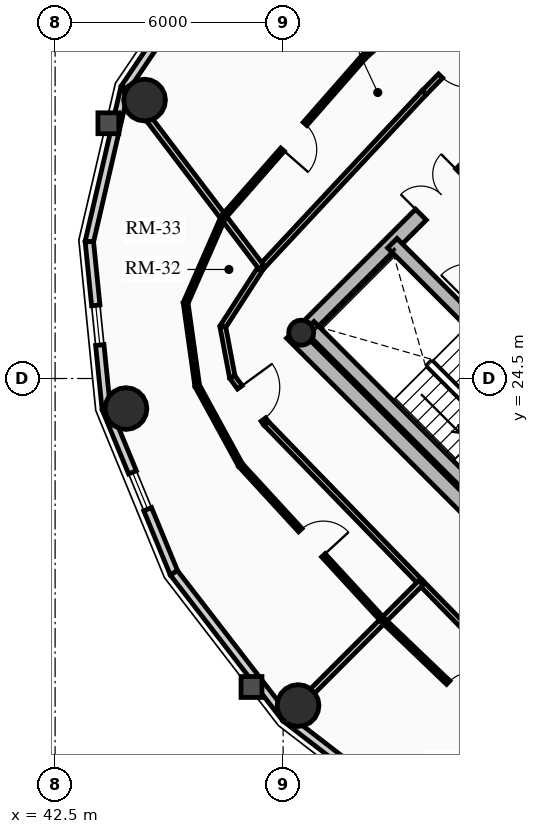
"""IFC4 building model, lengths in metres.
Left out: names, types, materials, properties, quantities, classifications, styles, units other than length and angle.
Written with IfcOpenShell. Run it as: python <this file> out.ifc"""

import sys

from ifc_helpers import new_model, si_unit, direction, frame, frame_2d, origin, origin_2d, place, context, subcontext, project, spatial, rectangle, circle, hollow_circle, extrude, source, transform, mapped, element, fill, save


model = new_model("IFC4")
c1 = context("Model", 3, precision=1e-05, world=origin(), true_north=direction((0.0, 1.0)))
c2 = subcontext(c1, "Body", "Model", "MODEL_VIEW")
j1 = project(units=[si_unit("LENGTHUNIT", "METRE"), si_unit("PLANEANGLEUNIT", "RADIAN")], contexts=[c1])
p1 = place(None, origin())
s1 = spatial("IfcSite", under=j1, at=p1, CompositionType="ELEMENT")
p2 = place(p1, origin())
s2 = spatial("IfcBuilding", under=s1, at=p2, CompositionType="ELEMENT")
p3 = place(p2, frame((0.0, 0.0, 222.85)))
s3 = spatial("IfcBuildingStorey", under=s2, at=p3, CompositionType="ELEMENT", Elevation=222.85)
p4 = place(p3, frame((58.702, 15.732, 0.0), z_axis=(0.0, 0.0, 1.0), x_axis=(-0.707106781187, 0.707106781187, 0.0)))
e1 = element("IfcWall", 1, at=p4, inside=s3, PredefinedType="SHEAR", context=c2, shape_type="SweptSolid", body=[
    extrude(rectangle(XDim=14.1, YDim=0.4, at=frame_2d((7.05, 0.0))), origin(), (0.0, 0.0, 1.0), 3.2),
])
p5 = place(p3, frame((48.873, 25.561, 0.0), z_axis=(0.0, 0.0, 1.0), x_axis=(0.707106781187, 0.707106781187, 0.0)))
e2 = element("IfcWall", 2, at=p5, inside=s3, PredefinedType="SHEAR", context=c2, shape_type="SweptSolid", body=[
    extrude(rectangle(XDim=10.7, YDim=0.4, at=frame_2d((5.35, 0.0))), origin(), (0.0, 0.0, 1.0), 3.2),
])
m1 = source(origin(), c2, "Body", "SweptSolid", [
    extrude(rectangle(XDim=1.5, YDim=2.02, at=frame_2d((0.75, 1.01))), frame((0.0, 0.21, 0.0), z_axis=(0.0, -1.0, 0.0), x_axis=(1.0, 0.0, 0.0)), (0.0, 0.0, 1.0), 0.42),
])
p6 = place(p5, frame((4.6, 0.0, 0.0)))
e3 = element("IfcOpeningElement", 3, at=p6, cuts=e2, PredefinedType="OPENING", context=c2, shape_type="MappedRepresentation", body=[
    mapped(m1, transform((0.0, 0.0, 0.0), x_axis=(1.0, 0.0, 0.0), y_axis=(0.0, 1.0, 0.0), z_axis=(0.0, 0.0, 1.0), scale=1.0)),
])
p7 = place(p3, frame((61.06, 18.373, 0.0), z_axis=(0.0, 0.0, 1.0), x_axis=(-0.707106781187, 0.707106781187, 0.0)))
e4 = element("IfcWall", 4, at=p7, inside=s3, PredefinedType="SHEAR", context=c2, shape_type="SweptSolid", body=[
    extrude(rectangle(XDim=13.7, YDim=0.35, at=frame_2d((6.85, 0.0))), origin(), (0.0, 0.0, 1.0), 3.2),
])
m2 = source(origin(), c2, "Body", "SweptSolid", [
    extrude(rectangle(XDim=1.1, YDim=2.015, at=frame_2d((0.55, 1.007))), frame((0.0, 0.185, 0.0), z_axis=(0.0, -1.0, 0.0), x_axis=(1.0, 0.0, 0.0)), (0.0, 0.0, 1.0), 0.37),
])
p8 = place(p7, frame((4.85, 0.0, 0.0)))
e5 = element("IfcOpeningElement", 5, at=p8, cuts=e4, PredefinedType="OPENING", context=c2, shape_type="MappedRepresentation", body=[
    mapped(m2, transform((0.0, 0.0, 0.0), x_axis=(1.0, 0.0, 0.0), y_axis=(0.0, 1.0, 0.0), z_axis=(0.0, 0.0, 1.0), scale=1.0)),
])
p9 = place(p7, frame((0.625, 0.0, 0.0)))
e6 = element("IfcOpeningElement", 6, at=p9, cuts=e4, PredefinedType="OPENING", context=c2, shape_type="MappedRepresentation", body=[
    mapped(m2, transform((0.0, 0.0, 0.0), x_axis=(1.0, 0.0, 0.0), y_axis=(0.0, 1.0, 0.0), z_axis=(0.0, 0.0, 1.0), scale=1.0)),
])
p10 = place(p7, frame((2.625, 0.0, 0.0)))
e7 = element("IfcOpeningElement", 7, at=p10, cuts=e4, PredefinedType="OPENING", context=c2, shape_type="MappedRepresentation", body=[
    mapped(m2, transform((0.0, 0.0, 0.0), x_axis=(1.0, 0.0, 0.0), y_axis=(0.0, 1.0, 0.0), z_axis=(0.0, 0.0, 1.0), scale=1.0)),
])
m3 = source(origin(), c2, "Body", "SweptSolid", [
    extrude(rectangle(XDim=1.15, YDim=2.02, at=frame_2d((0.575, 1.01))), frame((0.0, 0.185, 0.0), z_axis=(0.0, -1.0, 0.0), x_axis=(1.0, 0.0, 0.0)), (0.0, 0.0, 1.0), 0.37),
])
p11 = place(p7, frame((7.27, 0.0, 0.0)))
e8 = element("IfcOpeningElement", 8, at=p11, cuts=e4, PredefinedType="OPENING", context=c2, shape_type="MappedRepresentation", body=[
    mapped(m3, transform((0.0, 0.0, 0.0), x_axis=(1.0, 0.0, 0.0), y_axis=(0.0, 1.0, 0.0), z_axis=(0.0, 0.0, 1.0), scale=1.0)),
])
p12 = place(p3, frame((53.922, 21.141, 0.0), z_axis=(0.0, 0.0, 1.0), x_axis=(-0.707106781187, 0.707106781187, 0.0)))
e9 = element("IfcWall", 9, at=p12, inside=s3, PredefinedType="SHEAR", context=c2, shape_type="SweptSolid", body=[
    extrude(rectangle(XDim=6.695, YDim=0.35, at=frame_2d((3.348, 0.0))), origin(), (0.0, 0.0, 1.0), 3.2),
])
p13 = place(p3, frame((48.976, 25.706, 0.0), z_axis=(0.0, 0.0, 1.0), x_axis=(0.707106781187, 0.707106781187, 0.0)))
e10 = element("IfcColumn", 10, at=p13, inside=s3, PredefinedType="COLUMN", context=c2, shape_type="SweptSolid", body=[
    extrude(hollow_circle(Radius=0.33, WallThickness=0.025, at=origin_2d()), origin(), (0.0, 0.0, 1.0), 3.2),
])
for number, where, z_axis, x_axis in (
    (11, (44.854, 31.827, 0.0), (0.0, 0.0, 1.0), (1.0, 0.0, 0.0)),
    (12, (44.365, 23.709, 0.0), (0.0, 0.0, 1.0), (1.0, 0.0, 0.0)),
    (13, (48.893, 15.893, 0.0), (0.0, 0.0, 1.0), (1.0, 0.0, 0.0)),
):
    element("IfcColumn", number, at=place(p3, frame(where, z_axis=z_axis, x_axis=x_axis)), inside=s3, PredefinedType="USERDEFINED", context=c2, shape_type="SweptSolid", body=[
        extrude(circle(Radius=0.55, at=origin_2d()), origin(), (0.0, 0.0, 1.0), 3.2),
    ])
p14 = place(p3, frame((44.337, 32.144, 0.0), z_axis=(0.0, 0.0, 1.0), x_axis=(0.559495003079, 0.828833723692, 0.0)))
e14 = element("IfcWall", 14, at=p14, inside=s3, PredefinedType="SOLIDWALL", context=c2, shape_type="SweptSolid", body=[
    extrude(rectangle(XDim=3.976, YDim=0.22, at=frame_2d((1.988, 0.0))), origin(), (0.0, 0.0, 1.0), 2.612),
])
m4 = source(origin(), c2, "Body", "SweptSolid", [
    extrude(rectangle(XDim=1.05, YDim=1.3, at=frame_2d((0.525, 0.65))), frame((0.0, 0.12, 0.0), z_axis=(0.0, -1.0, 0.0), x_axis=(1.0, 0.0, 0.0)), (0.0, 0.0, 1.0), 0.24),
])
p15 = place(p14, frame((1.463, 0.0, 0.65)))
e15 = element("IfcOpeningElement", 15, at=p15, cuts=e14, PredefinedType="OPENING", context=c2, shape_type="MappedRepresentation", body=[
    mapped(m4, transform((0.0, 0.0, 0.0), x_axis=(1.0, 0.0, 0.0), y_axis=(0.0, 1.0, 0.0), z_axis=(0.0, 0.0, 1.0), scale=1.0)),
])
p16 = place(p3, frame((43.401, 28.1, 0.0), z_axis=(0.0, 0.0, 1.0), x_axis=(0.225473813158, 0.974249228678, 0.0)))
e16 = element("IfcWall", 16, at=p16, inside=s3, PredefinedType="SOLIDWALL", context=c2, shape_type="SweptSolid", body=[
    extrude(rectangle(XDim=4.15, YDim=0.22, at=frame_2d((2.075, 0.0))), origin(), (0.0, 0.0, 1.0), 2.612),
])
p17 = place(p3, frame((43.845, 23.705, 0.0), z_axis=(0.0, 0.0, 1.0), x_axis=(-0.100570534541, 0.994929930991, 0.0)))
e17 = element("IfcWall", 17, at=p17, inside=s3, PredefinedType="SOLIDWALL", context=c2, shape_type="SweptSolid", body=[
    extrude(rectangle(XDim=4.418, YDim=0.22, at=frame_2d((2.209, 0.0))), origin(), (0.0, 0.0, 1.0), 2.612),
])
p18 = place(p17, frame((1.684, 0.0, 0.65)))
e18 = element("IfcOpeningElement", 18, at=p18, cuts=e17, PredefinedType="OPENING", context=c2, shape_type="MappedRepresentation", body=[
    mapped(m4, transform((0.0, 0.0, 0.0), x_axis=(1.0, 0.0, 0.0), y_axis=(0.0, 1.0, 0.0), z_axis=(0.0, 0.0, 1.0), scale=1.0)),
])
p19 = place(p3, frame((45.626, 19.387, 0.0), z_axis=(0.0, 0.0, 1.0), x_axis=(-0.381309704956, 0.924447353237, 0.0)))
e19 = element("IfcWall", 19, at=p19, inside=s3, PredefinedType="SOLIDWALL", context=c2, shape_type="SweptSolid", body=[
    extrude(rectangle(XDim=4.671, YDim=0.22, at=frame_2d((2.335, 0.0))), origin(), (0.0, 0.0, 1.0), 2.612),
])
p20 = place(p19, frame((1.81, 0.0, 0.65)))
e20 = element("IfcOpeningElement", 20, at=p20, cuts=e19, PredefinedType="OPENING", context=c2, shape_type="MappedRepresentation", body=[
    mapped(m4, transform((0.0, 0.0, 0.0), x_axis=(1.0, 0.0, 0.0), y_axis=(0.0, 1.0, 0.0), z_axis=(0.0, 0.0, 1.0), scale=1.0)),
])
p21 = place(p3, frame((48.569, 15.569, 0.0), z_axis=(0.0, 0.0, 1.0), x_axis=(-0.610523083886, 0.791998462147, 0.0)))
e21 = element("IfcWall", 21, at=p21, inside=s3, PredefinedType="SOLIDWALL", context=c2, shape_type="SweptSolid", body=[
    extrude(rectangle(XDim=4.82, YDim=0.22, at=frame_2d((2.41, 0.0))), origin(), (0.0, 0.0, 1.0), 2.612),
])
p22 = place(p3, frame((52.387, 12.626, 0.0), z_axis=(0.0, 0.0, 1.0), x_axis=(-0.791998462147, 0.610523083886, 0.0)))
e22 = element("IfcWall", 22, at=p22, inside=s3, PredefinedType="SOLIDWALL", context=c2, shape_type="SweptSolid", body=[
    extrude(rectangle(XDim=4.82, YDim=0.22, at=frame_2d((2.41, 0.0))), origin(), (0.0, 0.0, 1.0), 2.612),
])
p23 = place(p22, frame((1.885, 0.0, 0.65)))
e23 = element("IfcOpeningElement", 23, at=p23, cuts=e22, PredefinedType="OPENING", context=c2, shape_type="MappedRepresentation", body=[
    mapped(m4, transform((0.0, 0.0, 0.0), x_axis=(1.0, 0.0, 0.0), y_axis=(0.0, 1.0, 0.0), z_axis=(0.0, 0.0, 1.0), scale=1.0)),
])
p24 = place(p3, frame((54.506, 34.344, 0.0), z_axis=(0.0, 0.0, 1.0), x_axis=(-0.703053402247, -0.711137056824, 0.0)))
e24 = element("IfcWall", 24, at=p24, inside=s3, PredefinedType="PARTITIONING", context=c2, shape_type="SweptSolid", body=[
    extrude(rectangle(XDim=3.262, YDim=0.15, at=frame_2d((1.631, 0.0))), origin(), (0.0, 0.0, 1.0), 2.612),
])
m5 = source(origin(), c2, "Body", "SweptSolid", [
    extrude(rectangle(XDim=1.05, YDim=2.015, at=frame_2d((0.525, 1.007))), frame((0.0, 0.085, 0.0), z_axis=(0.0, -1.0, 0.0), x_axis=(1.0, 0.0, 0.0)), (0.0, 0.0, 1.0), 0.17),
])
p25 = place(p24, frame((1.599, 0.0, 0.0)))
e25 = element("IfcOpeningElement", 25, at=p25, cuts=e24, PredefinedType="OPENING", context=c2, shape_type="MappedRepresentation", body=[
    mapped(m5, transform((0.0, 0.0, 0.0), x_axis=(1.0, 0.0, 0.0), y_axis=(0.0, 1.0, 0.0), z_axis=(0.0, 0.0, 1.0), scale=1.0)),
])
p26 = place(p3, frame((52.212, 32.024, 0.0), z_axis=(0.0, 0.0, 1.0), x_axis=(-0.682158998173, -0.731203871169, 0.0)))
e26 = element("IfcWall", 26, at=p26, inside=s3, PredefinedType="PARTITIONING", context=c2, shape_type="SweptSolid", body=[
    extrude(rectangle(XDim=6.282, YDim=0.15, at=frame_2d((3.141, 0.0))), origin(), (0.0, 0.0, 1.0), 2.545),
])
p27 = place(p3, frame((47.927, 27.431, 0.0), z_axis=(0.0, 0.0, 1.0), x_axis=(-0.543126643356, -0.839650790077, 0.0)))
e27 = element("IfcWall", 27, at=p27, inside=s3, PredefinedType="PARTITIONING", context=c2, shape_type="SweptSolid", body=[
    extrude(rectangle(XDim=1.868, YDim=0.15, at=frame_2d((0.934, 0.0))), origin(), (0.0, 0.0, 1.0), 2.545),
])
p28 = place(p3, frame((46.912, 25.862, 0.0), z_axis=(0.0, 0.0, 1.0), x_axis=(0.186095172215, -0.98253172309, 0.0)))
e28 = element("IfcWall", 28, at=p28, inside=s3, PredefinedType="PARTITIONING", context=c2, shape_type="SweptSolid", body=[
    extrude(rectangle(XDim=1.346, YDim=0.15, at=frame_2d((0.673, 0.0))), origin(), (0.0, 0.0, 1.0), 2.612),
])
p29 = place(p3, frame((47.163, 24.54, 0.0), z_axis=(0.0, 0.0, 1.0), x_axis=(0.589711902124, -0.807613690135, 0.0)))
e29 = element("IfcWall", 29, at=p29, inside=s3, PredefinedType="PARTITIONING", context=c2, shape_type="SweptSolid", body=[
    extrude(rectangle(XDim=1.507, YDim=0.15, at=frame_2d((0.753, 0.0))), origin(), (0.0, 0.0, 1.0), 2.545),
])
p30 = place(p29, frame((0.337, 0.0, 0.0)))
e30 = element("IfcOpeningElement", 30, at=p30, cuts=e29, PredefinedType="OPENING", context=c2, shape_type="MappedRepresentation", body=[
    mapped(m5, transform((0.0, 0.0, 0.0), x_axis=(1.0, 0.0, 0.0), y_axis=(0.0, 1.0, 0.0), z_axis=(0.0, 0.0, 1.0), scale=1.0)),
])
p31 = place(p3, frame((48.052, 23.323, 0.0), z_axis=(0.0, 0.0, 1.0), x_axis=(0.696573981306, -0.717484974454, 0.0)))
e31 = element("IfcWall", 31, at=p31, inside=s3, PredefinedType="PARTITIONING", context=c2, shape_type="SweptSolid", body=[
    extrude(rectangle(XDim=5.849, YDim=0.15, at=frame_2d((2.925, 0.0))), origin(), (0.0, 0.0, 1.0), 2.975),
])
p32 = place(p3, frame((52.126, 19.126, 0.0), z_axis=(0.0, 0.0, 1.0), x_axis=(0.698979087027, -0.715142108884, 0.0)))
e32 = element("IfcWall", 32, at=p32, inside=s3, PredefinedType="PARTITIONING", context=c2, shape_type="SweptSolid", body=[
    extrude(rectangle(XDim=5.966, YDim=0.15, at=frame_2d((2.983, 0.0))), origin(), (0.0, 0.0, 1.0), 2.612),
])
p33 = place(p3, frame((47.927, 27.431, 0.0), z_axis=(0.0, 0.0, 1.0), x_axis=(-0.604823333103, 0.796359677366, 0.0)))
e33 = element("IfcWall", 33, at=p33, inside=s3, PredefinedType="PARTITIONING", context=c2, shape_type="SweptSolid", body=[
    extrude(rectangle(XDim=5.907, YDim=0.16, at=frame_2d((2.953, 0.0))), origin(), (0.0, 0.0, 1.0), 2.612),
])
p34 = place(p3, frame((52.126, 19.126, 0.0), z_axis=(0.0, 0.0, 1.0), x_axis=(-0.707106781187, -0.707106781187, 0.0)))
e34 = element("IfcWall", 34, at=p34, inside=s3, PredefinedType="PARTITIONING", context=c2, shape_type="SweptSolid", body=[
    extrude(rectangle(XDim=5.01, YDim=0.16, at=frame_2d((2.505, 0.0))), origin(), (0.0, 0.0, 1.0), 2.612),
])
p35 = place(p3, frame((53.206, 35.268, 0.0), z_axis=(0.0, 0.0, 1.0), x_axis=(-0.746677760999, -0.665185929819, 0.0)))
e35 = element("IfcWall", 35, at=p35, inside=s3, PredefinedType="PARTITIONING", context=c2, shape_type="SweptSolid", body=[
    extrude(rectangle(XDim=3.445, YDim=0.125, at=frame_2d((1.723, 0.0))), origin(), (0.0, 0.0, 1.0), 2.612),
])
p36 = place(p3, frame((50.634, 32.977, 0.0), z_axis=(0.0, 0.0, 1.0), x_axis=(-0.659241945747, -0.751930885765, 0.0)))
e36 = element("IfcWall", 36, at=p36, inside=s3, PredefinedType="PARTITIONING", context=c2, shape_type="SweptSolid", body=[
    extrude(rectangle(XDim=5.624, YDim=0.125, at=frame_2d((2.812, 0.0))), origin(), (0.0, 0.0, 1.0), 2.545),
])
m6 = source(origin(), c2, "Body", "SweptSolid", [
    extrude(rectangle(XDim=0.9, YDim=2.005, at=frame_2d((0.45, 1.002))), frame((0.0, 0.073, 0.0), z_axis=(0.0, -1.0, 0.0), x_axis=(1.0, 0.0, 0.0)), (0.0, 0.0, 1.0), 0.145),
])
p37 = place(p36, frame((2.362, 0.0, 0.0)))
e37 = element("IfcOpeningElement", 37, at=p37, cuts=e36, PredefinedType="OPENING", context=c2, shape_type="MappedRepresentation", body=[
    mapped(m6, transform((0.0, 0.0, 0.0), x_axis=(1.0, 0.0, 0.0), y_axis=(0.0, 1.0, 0.0), z_axis=(0.0, 0.0, 1.0), scale=1.0)),
])
p38 = place(p3, frame((46.927, 28.748, 0.0), z_axis=(0.0, 0.0, 1.0), x_axis=(-0.401820136661, -0.91571861277, 0.0)))
e38 = element("IfcWall", 38, at=p38, inside=s3, PredefinedType="PARTITIONING", context=c2, shape_type="SweptSolid", body=[
    extrude(rectangle(XDim=2.468, YDim=0.125, at=frame_2d((1.234, 0.0))), origin(), (0.0, 0.0, 1.0), 2.545),
])
p39 = place(p3, frame((45.935, 26.488, 0.0), z_axis=(0.0, 0.0, 1.0), x_axis=(0.138347758345, -0.990383712387, 0.0)))
e39 = element("IfcWall", 39, at=p39, inside=s3, PredefinedType="PARTITIONING", context=c2, shape_type="SweptSolid", body=[
    extrude(rectangle(XDim=2.202, YDim=0.125, at=frame_2d((1.101, 0.0))), origin(), (0.0, 0.0, 1.0), 2.612),
])
p40 = place(p3, frame((46.24, 24.307, 0.0), z_axis=(0.0, 0.0, 1.0), x_axis=(0.479212341296, -0.87769899849, 0.0)))
e40 = element("IfcWall", 40, at=p40, inside=s3, PredefinedType="PARTITIONING", context=c2, shape_type="SweptSolid", body=[
    extrude(rectangle(XDim=2.374, YDim=0.125, at=frame_2d((1.187, 0.0))), origin(), (0.0, 0.0, 1.0), 2.545),
])
p41 = place(p3, frame((47.377, 22.223, 0.0), z_axis=(0.0, 0.0, 1.0), x_axis=(0.676554417653, -0.736392639802, 0.0)))
e41 = element("IfcWall", 41, at=p41, inside=s3, PredefinedType="PARTITIONING", context=c2, shape_type="SweptSolid", body=[
    extrude(rectangle(XDim=5.553, YDim=0.125, at=frame_2d((2.776, 0.0))), origin(), (0.0, 0.0, 1.0), 2.975),
])
p42 = place(p41, frame((2.326, 0.0, 0.0)))
e42 = element("IfcOpeningElement", 42, at=p42, cuts=e41, PredefinedType="OPENING", context=c2, shape_type="MappedRepresentation", body=[
    mapped(m6, transform((0.0, 0.0, 0.0), x_axis=(1.0, 0.0, 0.0), y_axis=(0.0, 1.0, 0.0), z_axis=(0.0, 0.0, 1.0), scale=1.0)),
])
p43 = place(p3, frame((51.134, 18.134, 0.0), z_axis=(0.0, 0.0, 1.0), x_axis=(0.722450775654, -0.691422357721, 0.0)))
e43 = element("IfcWall", 43, at=p43, inside=s3, PredefinedType="PARTITIONING", context=c2, shape_type="SweptSolid", body=[
    extrude(rectangle(XDim=5.634, YDim=0.125, at=frame_2d((2.817, 0.0))), origin(), (0.0, 0.0, 1.0), 2.612),
])
p44 = place(p43, frame((2.367, 0.0, 0.0)))
e44 = element("IfcOpeningElement", 44, at=p44, cuts=e43, PredefinedType="OPENING", context=c2, shape_type="MappedRepresentation", body=[
    mapped(m6, transform((0.0, 0.0, 0.0), x_axis=(1.0, 0.0, 0.0), y_axis=(0.0, 1.0, 0.0), z_axis=(0.0, 0.0, 1.0), scale=1.0)),
])
m7 = source(origin(), c2, "Body", "SweptSolid", [
    extrude(rectangle(XDim=1.05, YDim=1.3, at=frame_2d((0.525, 0.65))), frame((0.0, 0.03, 0.0), z_axis=(0.0, -1.0, 0.0), x_axis=(1.0, 0.0, 0.0)), (0.0, 0.0, 1.0), 0.06),
])
p45 = place(p18, origin())
e45 = element("IfcWindow", 45, at=p45, inside=s3, PartitioningType="SINGLE_PANEL", PredefinedType="WINDOW", context=c2, shape_type="MappedRepresentation", body=[
    mapped(m7, transform((0.0, 0.0, 0.0), x_axis=(1.0, 0.0, 0.0), y_axis=(0.0, 1.0, 0.0), z_axis=(0.0, 0.0, 1.0), scale=1.0)),
])
fill(e18, e45)
p46 = place(p20, origin())
e46 = element("IfcWindow", 46, at=p46, inside=s3, PartitioningType="SINGLE_PANEL", PredefinedType="WINDOW", context=c2, shape_type="MappedRepresentation", body=[
    mapped(m7, transform((0.0, 0.0, 0.0), x_axis=(1.0, 0.0, 0.0), y_axis=(0.0, 1.0, 0.0), z_axis=(0.0, 0.0, 1.0), scale=1.0)),
])
fill(e20, e46)
m8 = source(origin(), c2, "Body", "SweptSolid", [
    extrude(rectangle(XDim=1.5, YDim=2.02, at=frame_2d((0.75, 1.01))), frame((0.0, 0.025, 0.0), z_axis=(0.0, -1.0, 0.0), x_axis=(1.0, 0.0, 0.0)), (0.0, 0.0, 1.0), 0.05),
])
p47 = place(p6, origin())
e47 = element("IfcDoor", 47, at=p47, inside=s3, OperationType="DOUBLE_DOOR_SINGLE_SWING", PredefinedType="DOOR", context=c2, shape_type="MappedRepresentation", body=[
    mapped(m8, transform((0.0, 0.0, 0.0), x_axis=(1.0, 0.0, 0.0), y_axis=(0.0, 1.0, 0.0), z_axis=(0.0, 0.0, 1.0), scale=1.0)),
])
fill(e3, e47)
m9 = source(origin(), c2, "Body", "SweptSolid", [
    extrude(rectangle(XDim=1.05, YDim=2.015, at=frame_2d((0.525, 1.007))), frame((0.0, 0.025, 0.0), z_axis=(0.0, -1.0, 0.0), x_axis=(1.0, 0.0, 0.0)), (0.0, 0.0, 1.0), 0.05),
])
p48 = place(p25, origin())
e48 = element("IfcDoor", 48, at=p48, inside=s3, OperationType="SINGLE_SWING_LEFT", PredefinedType="DOOR", context=c2, shape_type="MappedRepresentation", body=[
    mapped(m9, transform((0.0, 0.0, 0.0), x_axis=(1.0, 0.0, 0.0), y_axis=(0.0, 1.0, 0.0), z_axis=(0.0, 0.0, 1.0), scale=1.0)),
])
fill(e25, e48)
m10 = source(origin(), c2, "Body", "SweptSolid", [
    extrude(rectangle(XDim=0.9, YDim=2.005, at=frame_2d((0.45, 1.002))), frame((0.0, 0.025, 0.0), z_axis=(0.0, -1.0, 0.0), x_axis=(1.0, 0.0, 0.0)), (0.0, 0.0, 1.0), 0.05),
])
p49 = place(p37, origin())
e49 = element("IfcDoor", 49, at=p49, inside=s3, OperationType="SINGLE_SWING_RIGHT", PredefinedType="DOOR", context=c2, shape_type="MappedRepresentation", body=[
    mapped(m10, transform((0.0, 0.0, 0.0), x_axis=(1.0, 0.0, 0.0), y_axis=(0.0, 1.0, 0.0), z_axis=(0.0, 0.0, 1.0), scale=1.0)),
])
fill(e37, e49)
p50 = place(p30, origin())
e50 = element("IfcDoor", 50, at=p50, inside=s3, OperationType="SINGLE_SWING_LEFT", PredefinedType="DOOR", context=c2, shape_type="MappedRepresentation", body=[
    mapped(m9, transform((0.0, 0.0, 0.0), x_axis=(1.0, 0.0, 0.0), y_axis=(0.0, 1.0, 0.0), z_axis=(0.0, 0.0, 1.0), scale=1.0)),
])
fill(e30, e50)
p51 = place(p42, origin())
e51 = element("IfcDoor", 51, at=p51, inside=s3, OperationType="SINGLE_SWING_RIGHT", PredefinedType="DOOR", context=c2, shape_type="MappedRepresentation", body=[
    mapped(m10, transform((0.0, 0.0, 0.0), x_axis=(1.0, 0.0, 0.0), y_axis=(0.0, 1.0, 0.0), z_axis=(0.0, 0.0, 1.0), scale=1.0)),
])
fill(e42, e51)
p52 = place(p44, origin())
e52 = element("IfcDoor", 52, at=p52, inside=s3, OperationType="SINGLE_SWING_RIGHT", PredefinedType="DOOR", context=c2, shape_type="MappedRepresentation", body=[
    mapped(m10, transform((0.0, 0.0, 0.0), x_axis=(1.0, 0.0, 0.0), y_axis=(0.0, 1.0, 0.0), z_axis=(0.0, 0.0, 1.0), scale=1.0)),
])
fill(e44, e52)
save(model, sys.argv[1])
